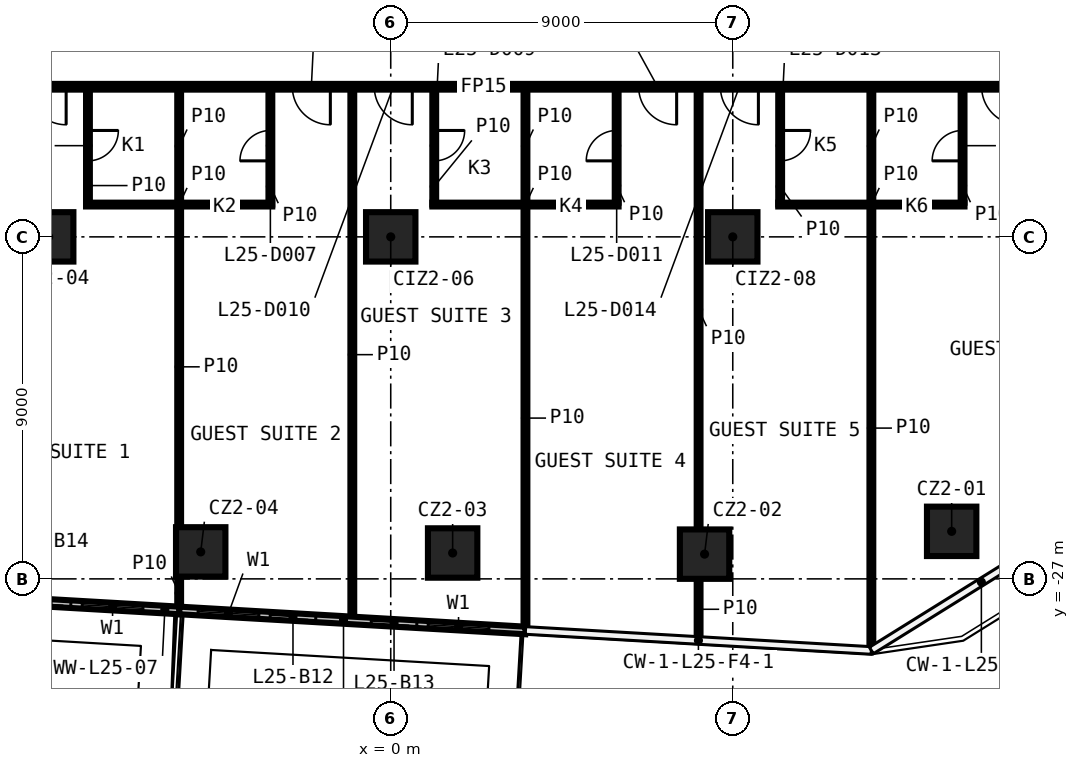
"""IFC4 building model, lengths in metres.
Left out: names, types, materials, properties, quantities, classifications, styles, units other than length and angle.
Written with IfcOpenShell. Run it as: python <this file> out.ifc"""

import sys

from ifc_helpers import new_model, si_unit, direction, frame, frame_2d, origin, origin_2d, place, context, subcontext, project, spatial, rectangle, extrude, element, fill, save


model = new_model("IFC4")
c1 = context("Model", 3, precision=1e-05, world=origin(), true_north=direction((0.0, 1.0)))
c2 = subcontext(c1, "Body", "Model", "MODEL_VIEW")
j1 = project(units=[si_unit("LENGTHUNIT", "METRE"), si_unit("PLANEANGLEUNIT", "RADIAN")], contexts=[c1])
p1 = place(None, origin())
s1 = spatial("IfcSite", under=j1, at=p1, CompositionType="ELEMENT")
p2 = place(p1, origin())
s2 = spatial("IfcBuilding", under=s1, at=p2, CompositionType="ELEMENT")
p3 = place(p2, frame((0.0, 0.0, 117.4)))
s3 = spatial("IfcBuildingStorey", under=s2, at=p3, CompositionType="ELEMENT", Elevation=117.4)
for number, where, z_axis, x_axis in (
    (1, (14.76, -25.749, 0.0), (0.0, 0.0, 1.0), (1.0, 0.0, 0.0)),
    (2, (8.258, -26.349, 0.0), (0.0, 0.0, 1.0), (1.0, 0.0, 0.0)),
    (3, (1.629, -26.319, 0.0), (0.0, 0.0, 1.0), (1.0, 0.0, 0.0)),
    (4, (-5.0, -26.29, 0.0), (0.0, 0.0, 1.0), (1.0, 0.0, 0.0)),
    (5, (-9.0, -18.0, 0.0), (0.0, 0.0, 1.0), (1.0, 0.0, 0.0)),
    (6, (0.0, -18.0, 0.0), (0.0, 0.0, 1.0), (1.0, 0.0, 0.0)),
    (7, (9.0, -18.0, 0.0), (0.0, 0.0, 1.0), (1.0, 0.0, 0.0)),
):
    element("IfcColumn", number, at=place(p3, frame(where, z_axis=z_axis, x_axis=x_axis)), inside=s3, PredefinedType="COLUMN", context=c2, shape_type="SweptSolid", body=[
        extrude(rectangle(XDim=1.3, YDim=1.3, at=origin_2d()), origin(), (0.0, 0.0, 1.0), 3.3),
    ])
for number, where, z_axis, x_axis in (
    (8, (-8.017, -17.15, 0.0), (0.0, 0.0, 1.0), (1.0, 0.0, 0.0)),
    (9, (1.095, -17.15, 0.0), (0.0, 0.0, 1.0), (1.0, 0.0, 0.0)),
    (10, (10.197, -17.15, 0.0), (0.0, 0.0, 1.0), (1.0, 0.0, 0.0)),
):
    element("IfcWall", number, at=place(p3, frame(where, z_axis=z_axis, x_axis=x_axis)), inside=s3, PredefinedType="PARTITIONING", context=c2, shape_type="SweptSolid", body=[
        extrude(rectangle(XDim=4.9, YDim=0.1, at=frame_2d((2.45, 0.0))), origin(), (0.0, 0.0, 1.0), 3.3),
    ])
p4 = place(p3, frame((17.125, -14.05, 0.0), z_axis=(0.0, 0.0, 1.0), x_axis=(-1.0, 0.0, 0.0)))
e11 = element("IfcWall", 11, at=p4, inside=s3, PredefinedType="PARTITIONING", context=c2, shape_type="SweptSolid", body=[
    extrude(rectangle(XDim=34.25, YDim=0.15, at=frame_2d((17.125, 0.0))), origin(), (0.0, 0.0, 1.0), 3.3),
])
p5 = place(p4, frame((32.089, 0.0, 0.0)))
e12 = element("IfcOpeningElement", 12, at=p5, cuts=e11, PredefinedType="OPENING", context=c2, shape_type="SweptSolid", body=[
    extrude(rectangle(XDim=0.9, YDim=2.1, at=frame_2d((0.45, 1.05))), frame((0.0, 0.085, 0.0), z_axis=(0.0, -1.0, 0.0), x_axis=(1.0, 0.0, 0.0)), (0.0, 0.0, 1.0), 0.17),
])
p6 = place(p4, frame((25.666, 0.0, 0.0)))
e13 = element("IfcOpeningElement", 13, at=p6, cuts=e11, PredefinedType="OPENING", context=c2, shape_type="SweptSolid", body=[
    extrude(rectangle(XDim=1.0, YDim=2.1, at=frame_2d((0.5, 1.05))), frame((0.0, 0.085, 0.0), z_axis=(0.0, -1.0, 0.0), x_axis=(1.0, 0.0, 0.0)), (0.0, 0.0, 1.0), 0.17),
])
p7 = place(p4, frame((18.714, 0.0, 0.0)))
e14 = element("IfcOpeningElement", 14, at=p7, cuts=e11, PredefinedType="OPENING", context=c2, shape_type="SweptSolid", body=[
    extrude(rectangle(XDim=1.0, YDim=2.1, at=frame_2d((0.5, 1.05))), frame((0.0, 0.085, 0.0), z_axis=(0.0, -1.0, 0.0), x_axis=(1.0, 0.0, 0.0)), (0.0, 0.0, 1.0), 0.17),
])
p8 = place(p4, frame((16.558, 0.0, 0.0)))
e15 = element("IfcOpeningElement", 15, at=p8, cuts=e11, PredefinedType="OPENING", context=c2, shape_type="SweptSolid", body=[
    extrude(rectangle(XDim=1.0, YDim=2.1, at=frame_2d((0.5, 1.05))), frame((0.0, 0.085, 0.0), z_axis=(0.0, -1.0, 0.0), x_axis=(1.0, 0.0, 0.0)), (0.0, 0.0, 1.0), 0.17),
])
p9 = place(p4, frame((9.602, 0.0, 0.0)))
e16 = element("IfcOpeningElement", 16, at=p9, cuts=e11, PredefinedType="OPENING", context=c2, shape_type="SweptSolid", body=[
    extrude(rectangle(XDim=1.0, YDim=2.1, at=frame_2d((0.5, 1.05))), frame((0.0, 0.085, 0.0), z_axis=(0.0, -1.0, 0.0), x_axis=(1.0, 0.0, 0.0)), (0.0, 0.0, 1.0), 0.17),
])
p10 = place(p4, frame((7.451, 0.0, 0.0)))
e17 = element("IfcOpeningElement", 17, at=p10, cuts=e11, PredefinedType="OPENING", context=c2, shape_type="SweptSolid", body=[
    extrude(rectangle(XDim=1.0, YDim=2.1, at=frame_2d((0.5, 1.05))), frame((0.0, 0.085, 0.0), z_axis=(0.0, -1.0, 0.0), x_axis=(1.0, 0.0, 0.0)), (0.0, 0.0, 1.0), 0.17),
])
p11 = place(p4, frame((0.576, 0.0, 0.0)))
e18 = element("IfcOpeningElement", 18, at=p11, cuts=e11, PredefinedType="OPENING", context=c2, shape_type="SweptSolid", body=[
    extrude(rectangle(XDim=1.0, YDim=2.1, at=frame_2d((0.5, 1.05))), frame((0.0, 0.085, 0.0), z_axis=(0.0, -1.0, 0.0), x_axis=(1.0, 0.0, 0.0)), (0.0, 0.0, 1.0), 0.17),
])
p12 = place(p3, frame((15.047, -17.1, 0.0), z_axis=(0.0, 0.0, 1.0), x_axis=(0.0, 1.0, 0.0)))
e19 = element("IfcWall", 19, at=p12, inside=s3, PredefinedType="PARTITIONING", context=c2, shape_type="SweptSolid", body=[
    extrude(rectangle(XDim=2.975, YDim=0.1, at=frame_2d((1.488, 0.0))), origin(), (0.0, 0.0, 1.0), 3.3),
])
p13 = place(p12, frame((1.1, 0.0, 0.0)))
e20 = element("IfcOpeningElement", 20, at=p13, cuts=e19, PredefinedType="OPENING", context=c2, shape_type="SweptSolid", body=[
    extrude(rectangle(XDim=0.8, YDim=2.1, at=frame_2d((0.4, 1.05))), frame((0.0, 0.06, 0.0), z_axis=(0.0, -1.0, 0.0), x_axis=(1.0, 0.0, 0.0)), (0.0, 0.0, 1.0), 0.12),
])
p14 = place(p3, frame((12.647, -28.864, 0.0), z_axis=(0.0, 0.0, 1.0), x_axis=(0.0, 1.0, 0.0)))
e21 = element("IfcWall", 21, at=p14, inside=s3, PredefinedType="PARTITIONING", context=c2, shape_type="SweptSolid", body=[
    extrude(rectangle(XDim=11.664, YDim=0.1, at=frame_2d((5.832, 0.0))), origin(), (0.0, 0.0, 1.0), 3.3),
])
p15 = place(p3, frame((12.647, -17.1, 0.0), z_axis=(0.0, 0.0, 1.0), x_axis=(0.0, 1.0, 0.0)))
e22 = element("IfcWall", 22, at=p15, inside=s3, PredefinedType="PARTITIONING", context=c2, shape_type="SweptSolid", body=[
    extrude(rectangle(XDim=2.975, YDim=0.1, at=frame_2d((1.488, 0.0))), origin(), (0.0, 0.0, 1.0), 3.3),
])
p16 = place(p3, frame((10.247, -14.125, 0.0), z_axis=(0.0, 0.0, 1.0), x_axis=(0.0, -1.0, 0.0)))
e23 = element("IfcWall", 23, at=p16, inside=s3, PredefinedType="PARTITIONING", context=c2, shape_type="SweptSolid", body=[
    extrude(rectangle(XDim=3.025, YDim=0.1, at=frame_2d((1.512, 0.0))), origin(), (0.0, 0.0, 1.0), 3.3),
])
p17 = place(p16, frame((1.075, 0.0, 0.0)))
e24 = element("IfcOpeningElement", 24, at=p17, cuts=e23, PredefinedType="OPENING", context=c2, shape_type="SweptSolid", body=[
    extrude(rectangle(XDim=0.8, YDim=2.1, at=frame_2d((0.4, 1.05))), frame((0.0, 0.06, 0.0), z_axis=(0.0, -1.0, 0.0), x_axis=(1.0, 0.0, 0.0)), (0.0, 0.0, 1.0), 0.12),
])
p18 = place(p3, frame((8.101, -28.601, 0.0), z_axis=(0.0, 0.0, 1.0), x_axis=(0.0, 1.0, 0.0)))
e25 = element("IfcWall", 25, at=p18, inside=s3, PredefinedType="PARTITIONING", context=c2, shape_type="SweptSolid", body=[
    extrude(rectangle(XDim=1.602, YDim=0.1, at=frame_2d((0.801, 0.0))), origin(), (0.0, 0.0, 1.0), 3.3),
])
p19 = place(p3, frame((8.101, -25.699, 0.0), z_axis=(0.0, 0.0, 1.0), x_axis=(0.0, 1.0, 0.0)))
e26 = element("IfcWall", 26, at=p19, inside=s3, PredefinedType="PARTITIONING", context=c2, shape_type="SweptSolid", body=[
    extrude(rectangle(XDim=11.574, YDim=0.1, at=frame_2d((5.787, 0.0))), origin(), (0.0, 0.0, 1.0), 3.3),
])
p20 = place(p3, frame((5.945, -17.1, 0.0), z_axis=(0.0, 0.0, 1.0), x_axis=(0.0, 1.0, 0.0)))
e27 = element("IfcWall", 27, at=p20, inside=s3, PredefinedType="PARTITIONING", context=c2, shape_type="SweptSolid", body=[
    extrude(rectangle(XDim=2.975, YDim=0.1, at=frame_2d((1.488, 0.0))), origin(), (0.0, 0.0, 1.0), 3.3),
])
p21 = place(p20, frame((1.1, 0.0, 0.0)))
e28 = element("IfcOpeningElement", 28, at=p21, cuts=e27, PredefinedType="OPENING", context=c2, shape_type="SweptSolid", body=[
    extrude(rectangle(XDim=0.8, YDim=2.1, at=frame_2d((0.4, 1.05))), frame((0.0, 0.06, 0.0), z_axis=(0.0, -1.0, 0.0), x_axis=(1.0, 0.0, 0.0)), (0.0, 0.0, 1.0), 0.12),
])
p22 = place(p3, frame((3.545, -28.338, 0.0), z_axis=(0.0, 0.0, 1.0), x_axis=(0.0, 1.0, 0.0)))
e29 = element("IfcWall", 29, at=p22, inside=s3, PredefinedType="PARTITIONING", context=c2, shape_type="SweptSolid", body=[
    extrude(rectangle(XDim=11.138, YDim=0.1, at=frame_2d((5.569, 0.0))), origin(), (0.0, 0.0, 1.0), 3.3),
])
p23 = place(p3, frame((3.545, -17.1, 0.0), z_axis=(0.0, 0.0, 1.0), x_axis=(0.0, 1.0, 0.0)))
e30 = element("IfcWall", 30, at=p23, inside=s3, PredefinedType="PARTITIONING", context=c2, shape_type="SweptSolid", body=[
    extrude(rectangle(XDim=2.975, YDim=0.1, at=frame_2d((1.488, 0.0))), origin(), (0.0, 0.0, 1.0), 3.3),
])
p24 = place(p3, frame((1.145, -14.125, 0.0), z_axis=(0.0, 0.0, 1.0), x_axis=(0.0, -1.0, 0.0)))
e31 = element("IfcWall", 31, at=p24, inside=s3, PredefinedType="PARTITIONING", context=c2, shape_type="SweptSolid", body=[
    extrude(rectangle(XDim=3.025, YDim=0.1, at=frame_2d((1.512, 0.0))), origin(), (0.0, 0.0, 1.0), 3.3),
])
p25 = place(p24, frame((1.075, 0.0, 0.0)))
e32 = element("IfcOpeningElement", 32, at=p25, cuts=e31, PredefinedType="OPENING", context=c2, shape_type="SweptSolid", body=[
    extrude(rectangle(XDim=0.8, YDim=2.1, at=frame_2d((0.4, 1.05))), frame((0.0, 0.06, 0.0), z_axis=(0.0, -1.0, 0.0), x_axis=(1.0, 0.0, 0.0)), (0.0, 0.0, 1.0), 0.12),
])
p26 = place(p3, frame((-1.011, -28.074, 0.0), z_axis=(0.0, 0.0, 1.0), x_axis=(0.0, 1.0, 0.0)))
e33 = element("IfcWall", 33, at=p26, inside=s3, PredefinedType="PARTITIONING", context=c2, shape_type="SweptSolid", body=[
    extrude(rectangle(XDim=13.949, YDim=0.1, at=frame_2d((6.975, 0.0))), origin(), (0.0, 0.0, 1.0), 3.3),
])
p27 = place(p3, frame((-3.167, -17.15, 0.0), z_axis=(0.0, 0.0, 1.0), x_axis=(0.0, 1.0, 0.0)))
e34 = element("IfcWall", 34, at=p27, inside=s3, PredefinedType="PARTITIONING", context=c2, shape_type="SweptSolid", body=[
    extrude(rectangle(XDim=3.025, YDim=0.1, at=frame_2d((1.512, 0.0))), origin(), (0.0, 0.0, 1.0), 3.3),
])
p28 = place(p27, frame((1.15, 0.0, 0.0)))
e35 = element("IfcOpeningElement", 35, at=p28, cuts=e34, PredefinedType="OPENING", context=c2, shape_type="SweptSolid", body=[
    extrude(rectangle(XDim=0.8, YDim=2.1, at=frame_2d((0.4, 1.05))), frame((0.0, 0.06, 0.0), z_axis=(0.0, -1.0, 0.0), x_axis=(1.0, 0.0, 0.0)), (0.0, 0.0, 1.0), 0.12),
])
p29 = place(p3, frame((-5.567, -27.811, 0.0), z_axis=(0.0, 0.0, 1.0), x_axis=(0.0, 1.0, 0.0)))
e36 = element("IfcWall", 36, at=p29, inside=s3, PredefinedType="PARTITIONING", context=c2, shape_type="SweptSolid", body=[
    extrude(rectangle(XDim=0.871, YDim=0.1, at=frame_2d((0.435, 0.0))), origin(), (0.0, 0.0, 1.0), 3.3),
])
p30 = place(p3, frame((-5.567, -25.64, 0.0), z_axis=(0.0, 0.0, 1.0), x_axis=(0.0, 1.0, 0.0)))
e37 = element("IfcWall", 37, at=p30, inside=s3, PredefinedType="PARTITIONING", context=c2, shape_type="SweptSolid", body=[
    extrude(rectangle(XDim=8.44, YDim=0.1, at=frame_2d((4.22, 0.0))), origin(), (0.0, 0.0, 1.0), 3.3),
])
p31 = place(p3, frame((-5.567, -17.1, 0.0), z_axis=(0.0, 0.0, 1.0), x_axis=(0.0, 1.0, 0.0)))
e38 = element("IfcWall", 38, at=p31, inside=s3, PredefinedType="PARTITIONING", context=c2, shape_type="SweptSolid", body=[
    extrude(rectangle(XDim=2.975, YDim=0.1, at=frame_2d((1.488, 0.0))), origin(), (0.0, 0.0, 1.0), 3.3),
])
p32 = place(p3, frame((-7.967, -14.125, 0.0), z_axis=(0.0, 0.0, 1.0), x_axis=(0.0, -1.0, 0.0)))
e39 = element("IfcWall", 39, at=p32, inside=s3, PredefinedType="PARTITIONING", context=c2, shape_type="SweptSolid", body=[
    extrude(rectangle(XDim=2.975, YDim=0.1, at=frame_2d((1.488, 0.0))), origin(), (0.0, 0.0, 1.0), 3.3),
])
p33 = place(p32, frame((1.075, 0.0, 0.0)))
e40 = element("IfcOpeningElement", 40, at=p33, cuts=e39, PredefinedType="OPENING", context=c2, shape_type="SweptSolid", body=[
    extrude(rectangle(XDim=0.8, YDim=2.1, at=frame_2d((0.4, 1.05))), frame((0.0, 0.06, 0.0), z_axis=(0.0, -1.0, 0.0), x_axis=(1.0, 0.0, 0.0)), (0.0, 0.0, 1.0), 0.12),
])
p34 = place(p3, frame((-5.567, -27.831, 0.0), z_axis=(0.0, 0.0, 1.0), x_axis=(0.998331175274, -0.057748285484, 0.0)))
e41 = element("IfcWall", 41, at=p34, inside=s3, PredefinedType="SOLIDWALL", context=c2, shape_type="SweptSolid", body=[
    extrude(rectangle(XDim=9.127, YDim=0.2, at=frame_2d((4.564, 0.0))), origin(), (0.0, 0.0, 1.0), 3.3),
])
p35 = place(p34, frame((0.5, 0.0, 0.6)))
e42 = element("IfcOpeningElement", 42, at=p35, cuts=e41, PredefinedType="OPENING", context=c2, shape_type="SweptSolid", body=[
    extrude(rectangle(XDim=1.6, YDim=2.4, at=frame_2d((0.8, 1.2))), frame((0.0, 0.11, 0.0), z_axis=(0.0, -1.0, 0.0), x_axis=(1.0, 0.0, 0.0)), (0.0, 0.0, 1.0), 0.22),
])
p36 = place(p34, frame((2.4, 0.0, 0.0)))
e43 = element("IfcOpeningElement", 43, at=p36, cuts=e41, PredefinedType="OPENING", context=c2, shape_type="SweptSolid", body=[
    extrude(rectangle(XDim=1.2, YDim=2.4, at=frame_2d((0.6, 1.2))), frame((0.0, 0.11, 0.0), z_axis=(0.0, -1.0, 0.0), x_axis=(1.0, 0.0, 0.0)), (0.0, 0.0, 1.0), 0.22),
])
p37 = place(p34, frame((6.564, 0.0, 0.6)))
e44 = element("IfcOpeningElement", 44, at=p37, cuts=e41, PredefinedType="OPENING", context=c2, shape_type="SweptSolid", body=[
    extrude(rectangle(XDim=1.6, YDim=2.4, at=frame_2d((0.8, 1.2))), frame((0.0, 0.11, 0.0), z_axis=(0.0, -1.0, 0.0), x_axis=(1.0, 0.0, 0.0)), (0.0, 0.0, 1.0), 0.22),
])
p38 = place(p34, frame((5.064, 0.0, 0.0)))
e45 = element("IfcOpeningElement", 45, at=p38, cuts=e41, PredefinedType="OPENING", context=c2, shape_type="SweptSolid", body=[
    extrude(rectangle(XDim=1.2, YDim=2.4, at=frame_2d((0.6, 1.2))), frame((0.0, 0.11, 0.0), z_axis=(0.0, -1.0, 0.0), x_axis=(1.0, 0.0, 0.0)), (0.0, 0.0, 1.0), 0.22),
])
p39 = place(p3, frame((-10.115, -27.568, 0.0), z_axis=(0.0, 0.0, 1.0), x_axis=(0.998332643992, -0.057722889224, 0.0)))
e46 = element("IfcWall", 46, at=p39, inside=s3, PredefinedType="SOLIDWALL", context=c2, shape_type="SweptSolid", body=[
    extrude(rectangle(XDim=4.555, YDim=0.2, at=frame_2d((2.278, 0.0))), origin(), (0.0, 0.0, 1.0), 3.3),
])
p40 = place(p39, frame((2.0, 0.0, 0.6)))
e47 = element("IfcOpeningElement", 47, at=p40, cuts=e46, PredefinedType="OPENING", context=c2, shape_type="SweptSolid", body=[
    extrude(rectangle(XDim=1.6, YDim=2.4, at=frame_2d((0.8, 1.2))), frame((0.0, 0.11, 0.0), z_axis=(0.0, -1.0, 0.0), x_axis=(1.0, 0.0, 0.0)), (0.0, 0.0, 1.0), 0.22),
])
p41 = place(p39, frame((0.5, 0.0, 0.0)))
e48 = element("IfcOpeningElement", 48, at=p41, cuts=e46, PredefinedType="OPENING", context=c2, shape_type="SweptSolid", body=[
    extrude(rectangle(XDim=1.2, YDim=2.4, at=frame_2d((0.6, 1.2))), frame((0.0, 0.11, 0.0), z_axis=(0.0, -1.0, 0.0), x_axis=(1.0, 0.0, 0.0)), (0.0, 0.0, 1.0), 0.22),
])
p42 = place(p33, origin())
e49 = element("IfcDoor", 49, at=p42, inside=s3, OperationType="SINGLE_SWING_RIGHT", PredefinedType="DOOR", context=c2, shape_type="SweptSolid", body=[
    extrude(rectangle(XDim=0.8, YDim=2.1, at=frame_2d((0.4, 1.05))), frame((0.0, 0.025, 0.0), z_axis=(0.0, -1.0, 0.0), x_axis=(1.0, 0.0, 0.0)), (0.0, 0.0, 1.0), 0.05),
])
fill(e40, e49)
p43 = place(p6, origin())
e50 = element("IfcDoor", 50, at=p43, inside=s3, OperationType="SINGLE_SWING_LEFT", PredefinedType="DOOR", context=c2, shape_type="SweptSolid", body=[
    extrude(rectangle(XDim=1.0, YDim=2.1, at=frame_2d((0.5, 1.05))), frame((0.0, 0.025, 0.0), z_axis=(0.0, -1.0, 0.0), x_axis=(1.0, 0.0, 0.0)), (0.0, 0.0, 1.0), 0.05),
])
fill(e13, e50)
p44 = place(p28, origin())
e51 = element("IfcDoor", 51, at=p44, inside=s3, OperationType="SINGLE_SWING_LEFT", PredefinedType="DOOR", context=c2, shape_type="SweptSolid", body=[
    extrude(rectangle(XDim=0.8, YDim=2.1, at=frame_2d((0.4, 1.05))), frame((0.0, 0.025, 0.0), z_axis=(0.0, -1.0, 0.0), x_axis=(1.0, 0.0, 0.0)), (0.0, 0.0, 1.0), 0.05),
])
fill(e35, e51)
p45 = place(p7, origin())
e52 = element("IfcDoor", 52, at=p45, inside=s3, OperationType="SINGLE_SWING_RIGHT", PredefinedType="DOOR", context=c2, shape_type="SweptSolid", body=[
    extrude(rectangle(XDim=1.0, YDim=2.1, at=frame_2d((0.5, 1.05))), frame((0.0, 0.025, 0.0), z_axis=(0.0, -1.0, 0.0), x_axis=(1.0, 0.0, 0.0)), (0.0, 0.0, 1.0), 0.05),
])
fill(e14, e52)
p46 = place(p25, origin())
e53 = element("IfcDoor", 53, at=p46, inside=s3, OperationType="SINGLE_SWING_RIGHT", PredefinedType="DOOR", context=c2, shape_type="SweptSolid", body=[
    extrude(rectangle(XDim=0.8, YDim=2.1, at=frame_2d((0.4, 1.05))), frame((0.0, 0.025, 0.0), z_axis=(0.0, -1.0, 0.0), x_axis=(1.0, 0.0, 0.0)), (0.0, 0.0, 1.0), 0.05),
])
fill(e32, e53)
p47 = place(p8, origin())
e54 = element("IfcDoor", 54, at=p47, inside=s3, OperationType="SINGLE_SWING_LEFT", PredefinedType="DOOR", context=c2, shape_type="SweptSolid", body=[
    extrude(rectangle(XDim=1.0, YDim=2.1, at=frame_2d((0.5, 1.05))), frame((0.0, 0.025, 0.0), z_axis=(0.0, -1.0, 0.0), x_axis=(1.0, 0.0, 0.0)), (0.0, 0.0, 1.0), 0.05),
])
fill(e15, e54)
p48 = place(p21, origin())
e55 = element("IfcDoor", 55, at=p48, inside=s3, OperationType="SINGLE_SWING_LEFT", PredefinedType="DOOR", context=c2, shape_type="SweptSolid", body=[
    extrude(rectangle(XDim=0.8, YDim=2.1, at=frame_2d((0.4, 1.05))), frame((0.0, 0.025, 0.0), z_axis=(0.0, -1.0, 0.0), x_axis=(1.0, 0.0, 0.0)), (0.0, 0.0, 1.0), 0.05),
])
fill(e28, e55)
p49 = place(p9, origin())
e56 = element("IfcDoor", 56, at=p49, inside=s3, OperationType="SINGLE_SWING_RIGHT", PredefinedType="DOOR", context=c2, shape_type="SweptSolid", body=[
    extrude(rectangle(XDim=1.0, YDim=2.1, at=frame_2d((0.5, 1.05))), frame((0.0, 0.025, 0.0), z_axis=(0.0, -1.0, 0.0), x_axis=(1.0, 0.0, 0.0)), (0.0, 0.0, 1.0), 0.05),
])
fill(e16, e56)
p50 = place(p17, origin())
e57 = element("IfcDoor", 57, at=p50, inside=s3, OperationType="SINGLE_SWING_RIGHT", PredefinedType="DOOR", context=c2, shape_type="SweptSolid", body=[
    extrude(rectangle(XDim=0.8, YDim=2.1, at=frame_2d((0.4, 1.05))), frame((0.0, 0.025, 0.0), z_axis=(0.0, -1.0, 0.0), x_axis=(1.0, 0.0, 0.0)), (0.0, 0.0, 1.0), 0.05),
])
fill(e24, e57)
p51 = place(p10, origin())
e58 = element("IfcDoor", 58, at=p51, inside=s3, OperationType="SINGLE_SWING_LEFT", PredefinedType="DOOR", context=c2, shape_type="SweptSolid", body=[
    extrude(rectangle(XDim=1.0, YDim=2.1, at=frame_2d((0.5, 1.05))), frame((0.0, 0.025, 0.0), z_axis=(0.0, -1.0, 0.0), x_axis=(1.0, 0.0, 0.0)), (0.0, 0.0, 1.0), 0.05),
])
fill(e17, e58)
p52 = place(p13, origin())
e59 = element("IfcDoor", 59, at=p52, inside=s3, OperationType="SINGLE_SWING_LEFT", PredefinedType="DOOR", context=c2, shape_type="SweptSolid", body=[
    extrude(rectangle(XDim=0.8, YDim=2.1, at=frame_2d((0.4, 1.05))), frame((0.0, 0.025, 0.0), z_axis=(0.0, -1.0, 0.0), x_axis=(1.0, 0.0, 0.0)), (0.0, 0.0, 1.0), 0.05),
])
fill(e20, e59)
p53 = place(p11, origin())
e60 = element("IfcDoor", 60, at=p53, inside=s3, OperationType="SINGLE_SWING_RIGHT", PredefinedType="DOOR", context=c2, shape_type="SweptSolid", body=[
    extrude(rectangle(XDim=1.0, YDim=2.1, at=frame_2d((0.5, 1.05))), frame((0.0, 0.025, 0.0), z_axis=(0.0, -1.0, 0.0), x_axis=(1.0, 0.0, 0.0)), (0.0, 0.0, 1.0), 0.05),
])
fill(e18, e60)
p54 = place(p35, origin())
e61 = element("IfcWindow", 61, at=p54, inside=s3, PartitioningType="SINGLE_PANEL", PredefinedType="WINDOW", context=c2, shape_type="SweptSolid", body=[
    extrude(rectangle(XDim=1.6, YDim=2.4, at=frame_2d((0.8, 1.2))), frame((0.0, 0.03, 0.0), z_axis=(0.0, -1.0, 0.0), x_axis=(1.0, 0.0, 0.0)), (0.0, 0.0, 1.0), 0.06),
])
fill(e42, e61)
p55 = place(p36, origin())
e62 = element("IfcDoor", 62, at=p55, inside=s3, OperationType="SLIDING_TO_LEFT", PredefinedType="DOOR", context=c2, shape_type="SweptSolid", body=[
    extrude(rectangle(XDim=1.2, YDim=2.4, at=frame_2d((0.6, 1.2))), frame((0.0, 0.025, 0.0), z_axis=(0.0, -1.0, 0.0), x_axis=(1.0, 0.0, 0.0)), (0.0, 0.0, 1.0), 0.05),
])
fill(e43, e62)
p56 = place(p37, origin())
e63 = element("IfcWindow", 63, at=p56, inside=s3, PartitioningType="SINGLE_PANEL", PredefinedType="WINDOW", context=c2, shape_type="SweptSolid", body=[
    extrude(rectangle(XDim=1.6, YDim=2.4, at=frame_2d((0.8, 1.2))), frame((0.0, 0.03, 0.0), z_axis=(0.0, -1.0, 0.0), x_axis=(1.0, 0.0, 0.0)), (0.0, 0.0, 1.0), 0.06),
])
fill(e44, e63)
p57 = place(p38, origin())
e64 = element("IfcDoor", 64, at=p57, inside=s3, OperationType="SLIDING_TO_LEFT", PredefinedType="DOOR", context=c2, shape_type="SweptSolid", body=[
    extrude(rectangle(XDim=1.2, YDim=2.4, at=frame_2d((0.6, 1.2))), frame((0.0, 0.025, 0.0), z_axis=(0.0, -1.0, 0.0), x_axis=(1.0, 0.0, 0.0)), (0.0, 0.0, 1.0), 0.05),
])
fill(e45, e64)
p58 = place(p40, origin())
e65 = element("IfcWindow", 65, at=p58, inside=s3, PartitioningType="SINGLE_PANEL", PredefinedType="WINDOW", context=c2, shape_type="SweptSolid", body=[
    extrude(rectangle(XDim=1.6, YDim=2.4, at=frame_2d((0.8, 1.2))), frame((0.0, 0.03, 0.0), z_axis=(0.0, -1.0, 0.0), x_axis=(1.0, 0.0, 0.0)), (0.0, 0.0, 1.0), 0.06),
])
fill(e47, e65)
p59 = place(p41, origin())
e66 = element("IfcDoor", 66, at=p59, inside=s3, OperationType="SLIDING_TO_LEFT", PredefinedType="DOOR", context=c2, shape_type="SweptSolid", body=[
    extrude(rectangle(XDim=1.2, YDim=2.4, at=frame_2d((0.6, 1.2))), frame((0.0, 0.025, 0.0), z_axis=(0.0, -1.0, 0.0), x_axis=(1.0, 0.0, 0.0)), (0.0, 0.0, 1.0), 0.05),
])
fill(e48, e66)
save(model, sys.argv[1])
